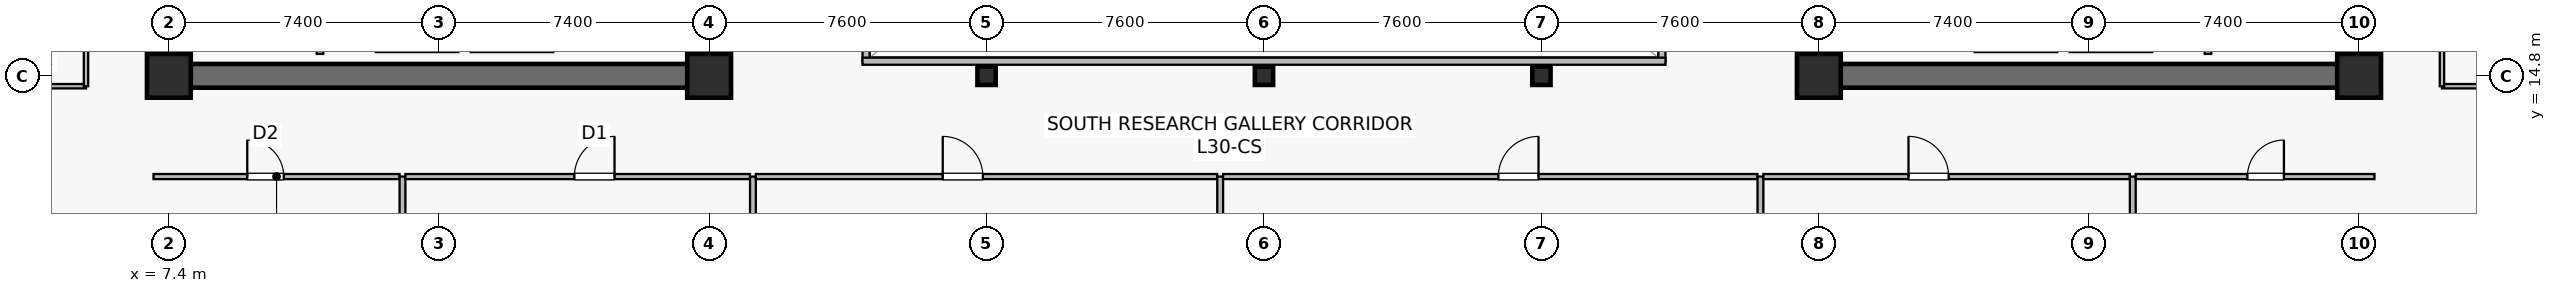
"""IFC4 building model, lengths in metres.
Left out: names, types, materials, properties, quantities, classifications, styles, units other than length and angle.
Written with IfcOpenShell. Run it as: python <this file> out.ifc"""

import sys

from ifc_helpers import new_model, si_unit, direction, frame, frame_2d, origin, origin_2d, place, context, subcontext, project, spatial, rectangle, hollow_rectangle, extrude, source, transform, mapped, element, fill, save


model = new_model("IFC4")
c1 = context("Model", 3, precision=1e-05, world=origin(), true_north=direction((0.0, 1.0)))
c2 = subcontext(c1, "Body", "Model", "MODEL_VIEW")
j1 = project(units=[si_unit("LENGTHUNIT", "METRE"), si_unit("PLANEANGLEUNIT", "RADIAN")], contexts=[c1])
p1 = place(None, origin())
s1 = spatial("IfcSite", under=j1, at=p1, CompositionType="ELEMENT")
p2 = place(p1, origin())
s2 = spatial("IfcBuilding", under=s1, at=p2, CompositionType="ELEMENT")
p3 = place(p2, frame((0.0, 0.0, 125.6)))
s3 = spatial("IfcBuildingStorey", under=s2, at=p3, CompositionType="ELEMENT", Elevation=125.6)
p4 = place(p3, frame((7.075, 14.8, 0.0), z_axis=(0.0, 0.0, 1.0), x_axis=(1.0, 0.0, 0.0)))
e1 = element("IfcWall", 1, at=p4, inside=s3, PredefinedType="SHEAR", context=c2, shape_type="SweptSolid", body=[
    extrude(rectangle(XDim=15.45, YDim=0.65, at=frame_2d((7.725, 0.0))), origin(), (0.0, 0.0, 1.0), 3.79),
])
p5 = place(p3, frame((7.4, 15.125, 0.0), z_axis=(0.0, 0.0, 1.0), x_axis=(0.0, 1.0, 0.0)))
e2 = element("IfcWall", 2, at=p5, inside=s3, PredefinedType="SHEAR", context=c2, shape_type="SweptSolid", body=[
    extrude(rectangle(XDim=18.35, YDim=0.65, at=frame_2d((9.175, 0.0))), origin(), (0.0, 0.0, 1.0), 3.79),
])
p6 = place(p3, frame((22.2, 15.125, 0.0), z_axis=(0.0, 0.0, 1.0), x_axis=(0.0, 1.0, 0.0)))
e3 = element("IfcWall", 3, at=p6, inside=s3, PredefinedType="SHEAR", context=c2, shape_type="SweptSolid", body=[
    extrude(rectangle(XDim=18.35, YDim=0.65, at=frame_2d((9.175, 0.0))), origin(), (0.0, 0.0, 1.0), 3.79),
])
p7 = place(p6, frame((3.425, 0.0, 0.0)))
e4 = element("IfcOpeningElement", 4, at=p7, cuts=e3, PredefinedType="OPENING", context=c2, shape_type="SweptSolid", body=[
    extrude(rectangle(XDim=1.42, YDim=2.2, at=frame_2d((0.71, 1.1))), frame((0.0, 0.335, 0.0), z_axis=(0.0, -1.0, 0.0), x_axis=(1.0, 0.0, 0.0)), (0.0, 0.0, 1.0), 0.67),
])
p8 = place(p3, frame((52.275, 14.8, 0.0), z_axis=(0.0, 0.0, 1.0), x_axis=(1.0, 0.0, 0.0)))
e5 = element("IfcWall", 5, at=p8, inside=s3, PredefinedType="SHEAR", context=c2, shape_type="SweptSolid", body=[
    extrude(rectangle(XDim=15.45, YDim=0.65, at=frame_2d((7.725, 0.0))), origin(), (0.0, 0.0, 1.0), 3.79),
])
p9 = place(p3, frame((52.6, 15.125, 0.0), z_axis=(0.0, 0.0, 1.0), x_axis=(0.0, 1.0, 0.0)))
e6 = element("IfcWall", 6, at=p9, inside=s3, PredefinedType="SHEAR", context=c2, shape_type="SweptSolid", body=[
    extrude(rectangle(XDim=18.35, YDim=0.65, at=frame_2d((9.175, 0.0))), origin(), (0.0, 0.0, 1.0), 3.79),
])
p10 = place(p9, frame((3.425, 0.0, 0.0)))
e7 = element("IfcOpeningElement", 7, at=p10, cuts=e6, PredefinedType="OPENING", context=c2, shape_type="SweptSolid", body=[
    extrude(rectangle(XDim=1.42, YDim=2.2, at=frame_2d((0.71, 1.1))), frame((0.0, 0.335, 0.0), z_axis=(0.0, -1.0, 0.0), x_axis=(1.0, 0.0, 0.0)), (0.0, 0.0, 1.0), 0.67),
])
p11 = place(p3, frame((67.4, 15.125, 0.0), z_axis=(0.0, 0.0, 1.0), x_axis=(0.0, 1.0, 0.0)))
e8 = element("IfcWall", 8, at=p11, inside=s3, PredefinedType="SHEAR", context=c2, shape_type="SweptSolid", body=[
    extrude(rectangle(XDim=18.35, YDim=0.65, at=frame_2d((9.175, 0.0))), origin(), (0.0, 0.0, 1.0), 3.79),
])
m1 = source(origin(), c2, "Body", "SweptSolid", [
    extrude(rectangle(XDim=1.2, YDim=1.2, at=origin_2d()), origin(), (0.0, 0.0, 1.0), 4.1),
])
for number, where, z_axis, x_axis in (
    (9, (7.4, 14.8, 0.0), (0.0, 0.0, 1.0), (1.0, 0.0, 0.0)),
    (10, (22.2, 14.8, 0.0), (0.0, 0.0, 1.0), (1.0, 0.0, 0.0)),
    (11, (52.6, 14.8, 0.0), (0.0, 0.0, 1.0), (1.0, 0.0, 0.0)),
    (12, (67.4, 14.8, 0.0), (0.0, 0.0, 1.0), (1.0, 0.0, 0.0)),
):
    element("IfcColumn", number, at=place(p3, frame(where, z_axis=z_axis, x_axis=x_axis)), inside=s3, PredefinedType="COLUMN", context=c2, shape_type="MappedRepresentation", body=[
        mapped(m1, transform((0.0, 0.0, 0.0), scale=1.0)),
    ])
m2 = source(origin(), c2, "Body", "SweptSolid", [
    extrude(hollow_rectangle(XDim=0.5, YDim=0.5, WallThickness=0.022, at=origin_2d()), origin(), (0.0, 0.0, 1.0), 4.1),
])
for number, where, z_axis, x_axis in (
    (13, (29.8, 14.8, 0.0), (0.0, 0.0, 1.0), (1.0, 0.0, 0.0)),
    (14, (37.4, 14.8, 0.0), (0.0, 0.0, 1.0), (1.0, 0.0, 0.0)),
    (15, (45.0, 14.8, 0.0), (0.0, 0.0, 1.0), (1.0, 0.0, 0.0)),
):
    element("IfcColumn", number, at=place(p3, frame(where, z_axis=z_axis, x_axis=x_axis)), inside=s3, PredefinedType="COLUMN", context=c2, shape_type="MappedRepresentation", body=[
        mapped(m2, transform((0.0, 0.0, 0.0), scale=1.0)),
    ])
p12 = place(p3, frame((13.07, 15.55, 0.0), z_axis=(0.0, 0.0, 1.0), x_axis=(1.0, 0.0, 0.0)))
e16 = element("IfcWall", 16, at=p12, inside=s3, PredefinedType="SOLIDWALL", context=c2, shape_type="SweptSolid", body=[
    extrude(rectangle(XDim=2.26, YDim=0.2, at=frame_2d((1.13, 0.0))), origin(), (0.0, 0.0, 1.0), 3.125),
])
p13 = place(p3, frame((15.67, 15.55, 0.0), z_axis=(0.0, 0.0, 1.0), x_axis=(1.0, 0.0, 0.0)))
e17 = element("IfcWall", 17, at=p13, inside=s3, PredefinedType="SOLIDWALL", context=c2, shape_type="SweptSolid", body=[
    extrude(rectangle(XDim=2.26, YDim=0.2, at=frame_2d((1.13, 0.0))), origin(), (0.0, 0.0, 1.0), 3.79),
])
p14 = place(p3, frame((11.54, 15.4, 0.0), z_axis=(0.0, 0.0, 1.0), x_axis=(0.0, 1.0, 0.0)))
e18 = element("IfcWall", 18, at=p14, inside=s3, PredefinedType="SOLIDWALL", context=c2, shape_type="SweptSolid", body=[
    extrude(rectangle(XDim=2.4, YDim=0.18, at=frame_2d((1.2, 0.0))), origin(), (0.0, 0.0, 1.0), 3.79),
])
p15 = place(p3, frame((59.47, 15.55, 0.0), z_axis=(0.0, 0.0, 1.0), x_axis=(1.0, 0.0, 0.0)))
e19 = element("IfcWall", 19, at=p15, inside=s3, PredefinedType="SOLIDWALL", context=c2, shape_type="SweptSolid", body=[
    extrude(rectangle(XDim=2.26, YDim=0.2, at=frame_2d((1.13, 0.0))), origin(), (0.0, 0.0, 1.0), 3.125),
])
p16 = place(p3, frame((56.87, 15.55, 0.0), z_axis=(0.0, 0.0, 1.0), x_axis=(1.0, 0.0, 0.0)))
e20 = element("IfcWall", 20, at=p16, inside=s3, PredefinedType="SOLIDWALL", context=c2, shape_type="SweptSolid", body=[
    extrude(rectangle(XDim=2.26, YDim=0.2, at=frame_2d((1.13, 0.0))), origin(), (0.0, 0.0, 1.0), 3.79),
])
p17 = place(p3, frame((63.26, 15.4, 0.0), z_axis=(0.0, 0.0, 1.0), x_axis=(0.0, 1.0, 0.0)))
e21 = element("IfcWall", 21, at=p17, inside=s3, PredefinedType="SOLIDWALL", context=c2, shape_type="SweptSolid", body=[
    extrude(rectangle(XDim=2.4, YDim=0.18, at=frame_2d((1.2, 0.0))), origin(), (0.0, 0.0, 1.0), 3.79),
])
p18 = place(p3, frame((26.5, 15.2, 0.0), z_axis=(0.0, 0.0, 1.0), x_axis=(0.0, 1.0, 0.0)))
e22 = element("IfcWall", 22, at=p18, inside=s3, PredefinedType="SOLIDWALL", context=c2, shape_type="SweptSolid", body=[
    extrude(rectangle(XDim=18.2, YDim=0.195, at=frame_2d((9.1, 0.0))), origin(), (0.0, 0.0, 1.0), 3.79),
])
p19 = place(p18, frame((1.8, 0.0, 0.9)))
e23 = element("IfcOpeningElement", 23, at=p19, cuts=e22, PredefinedType="OPENING", context=c2, shape_type="SweptSolid", body=[
    extrude(rectangle(XDim=1.5, YDim=1.4, at=frame_2d((0.75, 0.7))), frame((0.0, 0.107, 0.0), z_axis=(0.0, -1.0, 0.0), x_axis=(1.0, 0.0, 0.0)), (0.0, 0.0, 1.0), 0.215),
])
p20 = place(p18, frame((13.2, 0.0, 0.9)))
e24 = element("IfcOpeningElement", 24, at=p20, cuts=e22, PredefinedType="OPENING", context=c2, shape_type="SweptSolid", body=[
    extrude(rectangle(XDim=1.5, YDim=1.4, at=frame_2d((0.75, 0.7))), frame((0.0, 0.107, 0.0), z_axis=(0.0, -1.0, 0.0), x_axis=(1.0, 0.0, 0.0)), (0.0, 0.0, 1.0), 0.215),
])
p21 = place(p3, frame((48.3, 15.2, 0.0), z_axis=(0.0, 0.0, 1.0), x_axis=(0.0, 1.0, 0.0)))
e25 = element("IfcWall", 25, at=p21, inside=s3, PredefinedType="SOLIDWALL", context=c2, shape_type="SweptSolid", body=[
    extrude(rectangle(XDim=18.2, YDim=0.195, at=frame_2d((9.1, 0.0))), origin(), (0.0, 0.0, 1.0), 3.79),
])
p22 = place(p21, frame((1.8, 0.0, 0.9)))
e26 = element("IfcOpeningElement", 26, at=p22, cuts=e25, PredefinedType="OPENING", context=c2, shape_type="SweptSolid", body=[
    extrude(rectangle(XDim=1.5, YDim=1.4, at=frame_2d((0.75, 0.7))), frame((0.0, 0.107, 0.0), z_axis=(0.0, -1.0, 0.0), x_axis=(1.0, 0.0, 0.0)), (0.0, 0.0, 1.0), 0.215),
])
p23 = place(p21, frame((13.2, 0.0, 0.9)))
e27 = element("IfcOpeningElement", 27, at=p23, cuts=e25, PredefinedType="OPENING", context=c2, shape_type="SweptSolid", body=[
    extrude(rectangle(XDim=1.5, YDim=1.4, at=frame_2d((0.75, 0.7))), frame((0.0, 0.107, 0.0), z_axis=(0.0, -1.0, 0.0), x_axis=(1.0, 0.0, 0.0)), (0.0, 0.0, 1.0), 0.215),
])
p24 = place(p3, frame((26.4, 15.2, 0.0), z_axis=(0.0, 0.0, 1.0), x_axis=(1.0, 0.0, 0.0)))
e28 = element("IfcWall", 28, at=p24, inside=s3, PredefinedType="SOLIDWALL", context=c2, shape_type="SweptSolid", body=[
    extrude(rectangle(XDim=22.0, YDim=0.195, at=frame_2d((11.0, 0.0))), origin(), (0.0, 0.0, 1.0), 3.79),
])
p25 = place(p3, frame((6.98, 12.04, 0.0), z_axis=(0.0, 0.0, 1.0), x_axis=(1.0, 0.0, 0.0)))
e29 = element("IfcWall", 29, at=p25, inside=s3, PredefinedType="PARTITIONING", context=c2, shape_type="SweptSolid", body=[
    extrude(rectangle(XDim=6.74, YDim=0.14, at=frame_2d((3.37, 0.0))), origin(), (0.0, 0.0, 1.0), 3.275),
])
p26 = place(p25, frame((2.568, 0.0, 0.0)))
e30 = element("IfcOpeningElement", 30, at=p26, cuts=e29, PredefinedType="OPENING", context=c2, shape_type="SweptSolid", body=[
    extrude(rectangle(XDim=1.0, YDim=2.15, at=frame_2d((0.5, 1.075))), frame((0.0, 0.08, 0.0), z_axis=(0.0, -1.0, 0.0), x_axis=(1.0, 0.0, 0.0)), (0.0, 0.0, 1.0), 0.16),
])
p27 = place(p3, frame((13.8, 1.41, 0.0), z_axis=(0.0, 0.0, 1.0), x_axis=(0.0, 1.0, 0.0)))
e31 = element("IfcWall", 31, at=p27, inside=s3, PredefinedType="PARTITIONING", context=c2, shape_type="SweptSolid", body=[
    extrude(rectangle(XDim=10.63, YDim=0.16, at=frame_2d((5.315, 0.0))), origin(), (0.0, 0.0, 1.0), 3.075),
])
p28 = place(p3, frame((13.88, 12.04, 0.0), z_axis=(0.0, 0.0, 1.0), x_axis=(1.0, 0.0, 0.0)))
e32 = element("IfcWall", 32, at=p28, inside=s3, PredefinedType="PARTITIONING", context=c2, shape_type="SweptSolid", body=[
    extrude(rectangle(XDim=9.44, YDim=0.14, at=frame_2d((4.72, 0.0))), origin(), (0.0, 0.0, 1.0), 3.125),
])
p29 = place(p28, frame((4.628, 0.0, 0.0)))
e33 = element("IfcOpeningElement", 33, at=p29, cuts=e32, PredefinedType="OPENING", context=c2, shape_type="SweptSolid", body=[
    extrude(rectangle(XDim=1.1, YDim=2.18, at=frame_2d((0.55, 1.09))), frame((0.0, 0.08, 0.0), z_axis=(0.0, -1.0, 0.0), x_axis=(1.0, 0.0, 0.0)), (0.0, 0.0, 1.0), 0.16),
])
p30 = place(p3, frame((23.4, 1.41, 0.0), z_axis=(0.0, 0.0, 1.0), x_axis=(0.0, 1.0, 0.0)))
e34 = element("IfcWall", 34, at=p30, inside=s3, PredefinedType="PARTITIONING", context=c2, shape_type="SweptSolid", body=[
    extrude(rectangle(XDim=10.63, YDim=0.16, at=frame_2d((5.315, 0.0))), origin(), (0.0, 0.0, 1.0), 3.075),
])
p31 = place(p3, frame((23.48, 12.04, 0.0), z_axis=(0.0, 0.0, 1.0), x_axis=(1.0, 0.0, 0.0)))
e35 = element("IfcWall", 35, at=p31, inside=s3, PredefinedType="PARTITIONING", context=c2, shape_type="SweptSolid", body=[
    extrude(rectangle(XDim=12.64, YDim=0.14, at=frame_2d((6.32, 0.0))), origin(), (0.0, 0.0, 1.0), 3.125),
])
p32 = place(p31, frame((5.12, 0.0, 0.0)))
e36 = element("IfcOpeningElement", 36, at=p32, cuts=e35, PredefinedType="OPENING", context=c2, shape_type="SweptSolid", body=[
    extrude(rectangle(XDim=1.1, YDim=2.18, at=frame_2d((0.55, 1.09))), frame((0.0, 0.08, 0.0), z_axis=(0.0, -1.0, 0.0), x_axis=(1.0, 0.0, 0.0)), (0.0, 0.0, 1.0), 0.16),
])
p33 = place(p3, frame((36.2, 2.61, 0.0), z_axis=(0.0, 0.0, 1.0), x_axis=(0.0, 1.0, 0.0)))
e37 = element("IfcWall", 37, at=p33, inside=s3, PredefinedType="PARTITIONING", context=c2, shape_type="SweptSolid", body=[
    extrude(rectangle(XDim=9.43, YDim=0.16, at=frame_2d((4.715, 0.0))), origin(), (0.0, 0.0, 1.0), 3.075),
])
p34 = place(p3, frame((36.28, 12.04, 0.0), z_axis=(0.0, 0.0, 1.0), x_axis=(1.0, 0.0, 0.0)))
e38 = element("IfcWall", 38, at=p34, inside=s3, PredefinedType="PARTITIONING", context=c2, shape_type="SweptSolid", body=[
    extrude(rectangle(XDim=14.64, YDim=0.14, at=frame_2d((7.32, 0.0))), origin(), (0.0, 0.0, 1.0), 3.125),
])
p35 = place(p34, frame((7.54, 0.0, 0.0)))
e39 = element("IfcOpeningElement", 39, at=p35, cuts=e38, PredefinedType="OPENING", context=c2, shape_type="SweptSolid", body=[
    extrude(rectangle(XDim=1.1, YDim=2.18, at=frame_2d((0.55, 1.09))), frame((0.0, 0.08, 0.0), z_axis=(0.0, -1.0, 0.0), x_axis=(1.0, 0.0, 0.0)), (0.0, 0.0, 1.0), 0.16),
])
p36 = place(p3, frame((51.0, 1.41, 0.0), z_axis=(0.0, 0.0, 1.0), x_axis=(0.0, 1.0, 0.0)))
e40 = element("IfcWall", 40, at=p36, inside=s3, PredefinedType="PARTITIONING", context=c2, shape_type="SweptSolid", body=[
    extrude(rectangle(XDim=10.63, YDim=0.16, at=frame_2d((5.315, 0.0))), origin(), (0.0, 0.0, 1.0), 3.075),
])
p37 = place(p3, frame((51.08, 12.04, 0.0), z_axis=(0.0, 0.0, 1.0), x_axis=(1.0, 0.0, 0.0)))
e41 = element("IfcWall", 41, at=p37, inside=s3, PredefinedType="PARTITIONING", context=c2, shape_type="SweptSolid", body=[
    extrude(rectangle(XDim=10.04, YDim=0.14, at=frame_2d((5.02, 0.0))), origin(), (0.0, 0.0, 1.0), 3.125),
])
p38 = place(p37, frame((3.976, 0.0, 0.0)))
e42 = element("IfcOpeningElement", 42, at=p38, cuts=e41, PredefinedType="OPENING", context=c2, shape_type="SweptSolid", body=[
    extrude(rectangle(XDim=1.1, YDim=2.18, at=frame_2d((0.55, 1.09))), frame((0.0, 0.08, 0.0), z_axis=(0.0, -1.0, 0.0), x_axis=(1.0, 0.0, 0.0)), (0.0, 0.0, 1.0), 0.16),
])
p39 = place(p3, frame((61.2, 1.41, 0.0), z_axis=(0.0, 0.0, 1.0), x_axis=(0.0, 1.0, 0.0)))
e43 = element("IfcWall", 43, at=p39, inside=s3, PredefinedType="PARTITIONING", context=c2, shape_type="SweptSolid", body=[
    extrude(rectangle(XDim=10.63, YDim=0.16, at=frame_2d((5.315, 0.0))), origin(), (0.0, 0.0, 1.0), 3.075),
])
p40 = place(p3, frame((61.28, 12.04, 0.0), z_axis=(0.0, 0.0, 1.0), x_axis=(1.0, 0.0, 0.0)))
e44 = element("IfcWall", 44, at=p40, inside=s3, PredefinedType="PARTITIONING", context=c2, shape_type="SweptSolid", body=[
    extrude(rectangle(XDim=6.54, YDim=0.14, at=frame_2d((3.27, 0.0))), origin(), (0.0, 0.0, 1.0), 3.275),
])
p41 = place(p40, frame((3.06, 0.0, 0.0)))
e45 = element("IfcOpeningElement", 45, at=p41, cuts=e44, PredefinedType="OPENING", context=c2, shape_type="SweptSolid", body=[
    extrude(rectangle(XDim=1.0, YDim=2.15, at=frame_2d((0.5, 1.075))), frame((0.0, 0.08, 0.0), z_axis=(0.0, -1.0, 0.0), x_axis=(1.0, 0.0, 0.0)), (0.0, 0.0, 1.0), 0.16),
])
p42 = place(p3, frame((2.11, 14.515, 0.0), z_axis=(0.0, 0.0, 1.0), x_axis=(1.0, 0.0, 0.0)))
e46 = element("IfcWall", 46, at=p42, inside=s3, PredefinedType="PARTITIONING", context=c2, shape_type="SweptSolid", body=[
    extrude(rectangle(XDim=3.02, YDim=0.12, at=frame_2d((1.51, 0.0))), origin(), (0.0, 0.0, 1.0), 3.79),
])
p43 = place(p3, frame((5.13, 14.515, 0.0), z_axis=(0.0, 0.0, 1.0), x_axis=(0.0, 1.0, 0.0)))
e47 = element("IfcWall", 47, at=p43, inside=s3, PredefinedType="PARTITIONING", context=c2, shape_type="SweptSolid", body=[
    extrude(rectangle(XDim=7.425, YDim=0.12, at=frame_2d((3.712, 0.0))), origin(), (0.0, 0.0, 1.0), 3.79),
])
p44 = place(p43, frame((3.262, 0.0, 0.0)))
e48 = element("IfcOpeningElement", 48, at=p44, cuts=e47, PredefinedType="OPENING", context=c2, shape_type="SweptSolid", body=[
    extrude(rectangle(XDim=0.9, YDim=2.1, at=frame_2d((0.45, 1.05))), frame((0.0, 0.07, 0.0), z_axis=(0.0, -1.0, 0.0), x_axis=(1.0, 0.0, 0.0)), (0.0, 0.0, 1.0), 0.14),
])
p45 = place(p3, frame((69.67, 14.515, 0.0), z_axis=(0.0, 0.0, 1.0), x_axis=(1.0, 0.0, 0.0)))
e49 = element("IfcWall", 49, at=p45, inside=s3, PredefinedType="PARTITIONING", context=c2, shape_type="SweptSolid", body=[
    extrude(rectangle(XDim=3.02, YDim=0.12, at=frame_2d((1.51, 0.0))), origin(), (0.0, 0.0, 1.0), 3.79),
])
p46 = place(p3, frame((69.67, 14.515, 0.0), z_axis=(0.0, 0.0, 1.0), x_axis=(0.0, 1.0, 0.0)))
e50 = element("IfcWall", 50, at=p46, inside=s3, PredefinedType="PARTITIONING", context=c2, shape_type="SweptSolid", body=[
    extrude(rectangle(XDim=19.57, YDim=0.12, at=frame_2d((9.785, 0.0))), origin(), (0.0, 0.0, 1.0), 3.79),
])
p47 = place(p46, frame((9.335, 0.0, 0.0)))
e51 = element("IfcOpeningElement", 51, at=p47, cuts=e50, PredefinedType="OPENING", context=c2, shape_type="SweptSolid", body=[
    extrude(rectangle(XDim=0.9, YDim=2.1, at=frame_2d((0.45, 1.05))), frame((0.0, 0.07, 0.0), z_axis=(0.0, -1.0, 0.0), x_axis=(1.0, 0.0, 0.0)), (0.0, 0.0, 1.0), 0.14),
])
m3 = source(origin(), c2, "Body", "SweptSolid", [
    extrude(rectangle(XDim=1.0, YDim=2.15, at=frame_2d((0.5, 1.075))), frame((0.0, 0.025, 0.0), z_axis=(0.0, -1.0, 0.0), x_axis=(1.0, 0.0, 0.0)), (0.0, 0.0, 1.0), 0.05),
])
p48 = place(p26, origin())
e52 = element("IfcDoor", 52, at=p48, inside=s3, OperationType="SINGLE_SWING_LEFT", PredefinedType="DOOR", context=c2, shape_type="MappedRepresentation", body=[
    mapped(m3, transform((0.0, 0.0, 0.0), scale=1.0)),
])
fill(e30, e52)
m4 = source(origin(), c2, "Body", "SweptSolid", [
    extrude(rectangle(XDim=1.1, YDim=2.18, at=frame_2d((0.55, 1.09))), frame((0.0, 0.025, 0.0), z_axis=(0.0, -1.0, 0.0), x_axis=(1.0, 0.0, 0.0)), (0.0, 0.0, 1.0), 0.05),
])
p49 = place(p29, origin())
e53 = element("IfcDoor", 53, at=p49, inside=s3, OperationType="SINGLE_SWING_RIGHT", PredefinedType="DOOR", context=c2, shape_type="MappedRepresentation", body=[
    mapped(m4, transform((0.0, 0.0, 0.0), scale=1.0)),
])
fill(e33, e53)
p50 = place(p32, origin())
e54 = element("IfcDoor", 54, at=p50, inside=s3, OperationType="SINGLE_SWING_LEFT", PredefinedType="DOOR", context=c2, shape_type="MappedRepresentation", body=[
    mapped(m4, transform((0.0, 0.0, 0.0), scale=1.0)),
])
fill(e36, e54)
p51 = place(p35, origin())
e55 = element("IfcDoor", 55, at=p51, inside=s3, OperationType="SINGLE_SWING_RIGHT", PredefinedType="DOOR", context=c2, shape_type="MappedRepresentation", body=[
    mapped(m4, transform((0.0, 0.0, 0.0), scale=1.0)),
])
fill(e39, e55)
p52 = place(p38, origin())
e56 = element("IfcDoor", 56, at=p52, inside=s3, OperationType="SINGLE_SWING_LEFT", PredefinedType="DOOR", context=c2, shape_type="MappedRepresentation", body=[
    mapped(m4, transform((0.0, 0.0, 0.0), scale=1.0)),
])
fill(e42, e56)
p53 = place(p41, origin())
e57 = element("IfcDoor", 57, at=p53, inside=s3, OperationType="SINGLE_SWING_RIGHT", PredefinedType="DOOR", context=c2, shape_type="MappedRepresentation", body=[
    mapped(m3, transform((0.0, 0.0, 0.0), scale=1.0)),
])
fill(e45, e57)
save(model, sys.argv[1])
